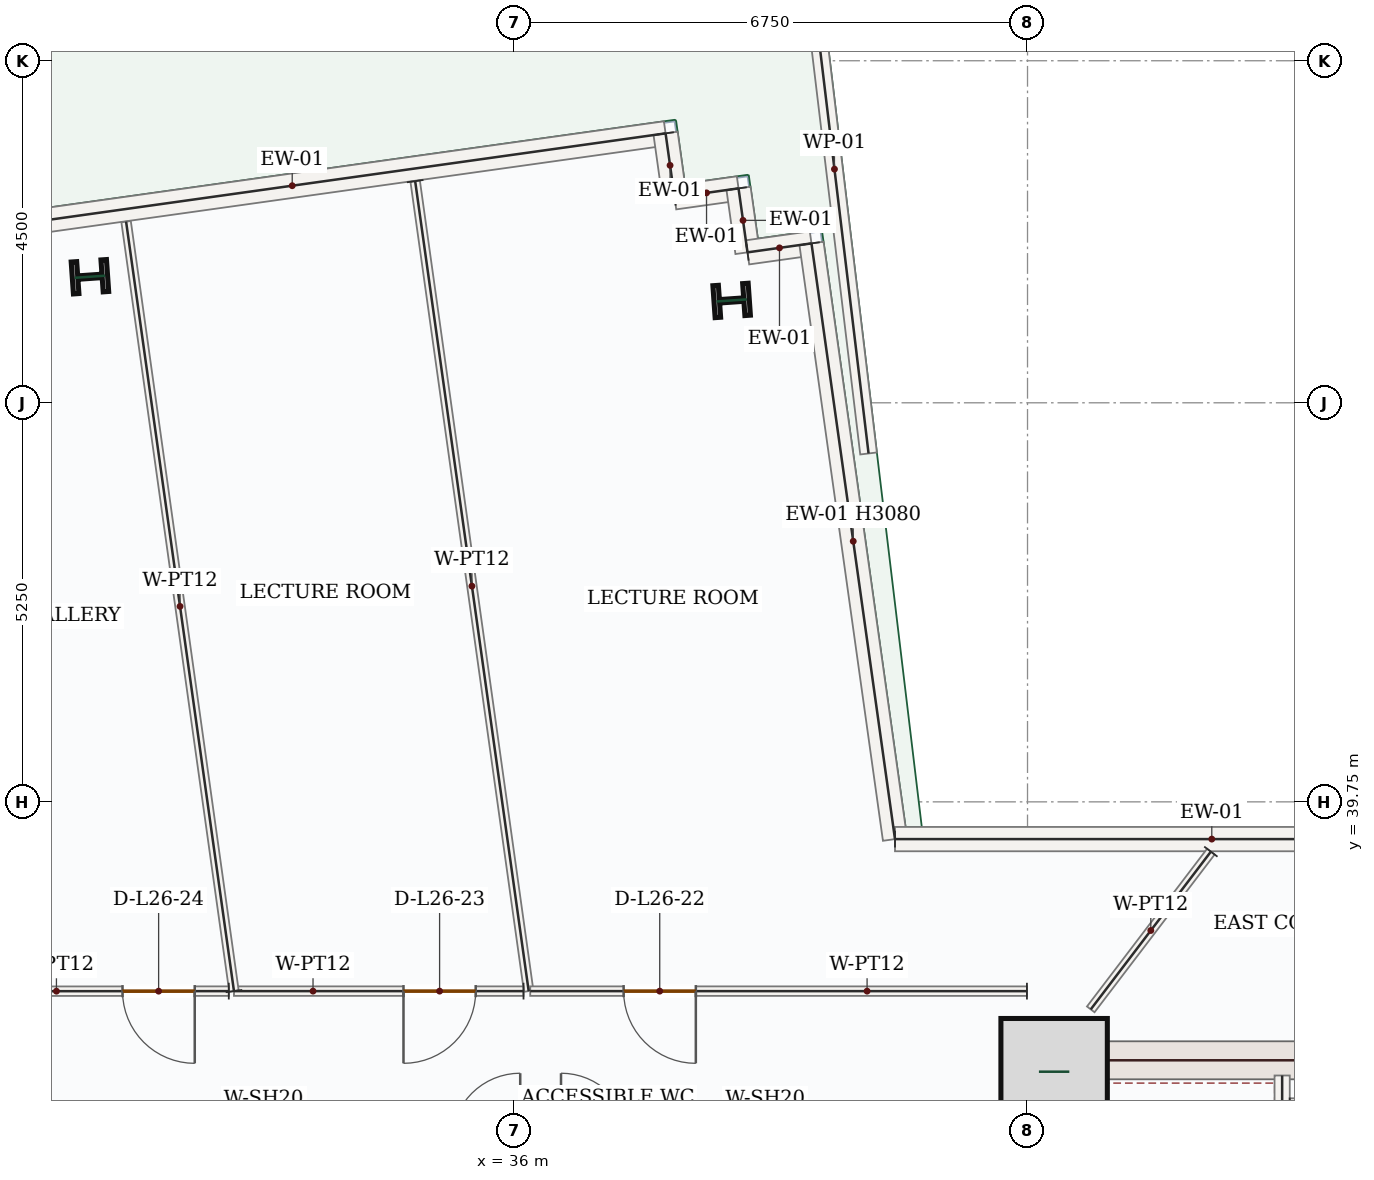
"""IFC4 building model, lengths in metres.
Left out: names, types, materials, properties, quantities, classifications, styles, units other than length and angle.
Written with IfcOpenShell. Run it as: python <this file> out.ifc"""

import sys

from ifc_helpers import new_model, si_unit, direction, frame, frame_2d, origin, origin_2d, place, context, subcontext, project, spatial, rectangle, i_section, extrude, source, transform, mapped, element, fill, save


model = new_model("IFC4")
c1 = context("Model", 3, precision=1e-05, world=origin(), true_north=direction((0.0, 1.0)))
c2 = subcontext(c1, "Body", "Model", "MODEL_VIEW")
j1 = project(units=[si_unit("LENGTHUNIT", "METRE"), si_unit("PLANEANGLEUNIT", "RADIAN")], contexts=[c1])
p1 = place(None, origin())
s1 = spatial("IfcSite", under=j1, at=p1, CompositionType="ELEMENT")
p2 = place(p1, origin())
s2 = spatial("IfcBuilding", under=s1, at=p2, CompositionType="ELEMENT")
p3 = place(p2, frame((0.0, 0.0, 117.3)))
s3 = spatial("IfcBuildingStorey", under=s2, at=p3, CompositionType="ELEMENT", Elevation=117.3)
p4 = place(p3, frame((43.0, 28.05, 0.0), z_axis=(0.0, 0.0, 1.0), x_axis=(0.0, 1.0, 0.0)))
e1 = element("IfcWall", 1, at=p4, inside=s3, PredefinedType="SHEAR", context=c2, shape_type="SweptSolid", body=[
    extrude(rectangle(XDim=8.55, YDim=0.5, at=frame_2d((4.275, 0.0))), origin(), (0.0, 0.0, 1.0), 3.95),
])
p5 = place(p4, frame((1.5, 0.0, 0.0)))
e2 = element("IfcOpeningElement", 2, at=p5, cuts=e1, PredefinedType="OPENING", context=c2, shape_type="SweptSolid", body=[
    extrude(rectangle(XDim=1.1, YDim=2.2, at=frame_2d((0.55, 1.1))), frame((0.0, 0.26, 0.0), z_axis=(0.0, -1.0, 0.0), x_axis=(1.0, 0.0, 0.0)), (0.0, 0.0, 1.0), 0.52),
])
m1 = source(origin(), c2, "Body", "SweptSolid", [
    extrude(rectangle(XDim=7.0, YDim=0.5, at=frame_2d((3.5, 0.0))), origin(), (0.0, 0.0, 1.0), 3.95),
])
p6 = place(p3, frame((43.25, 36.35, 0.0), z_axis=(0.0, 0.0, 1.0), x_axis=(1.0, 0.0, 0.0)))
e3 = element("IfcWall", 3, at=p6, inside=s3, PredefinedType="SHEAR", context=c2, shape_type="MappedRepresentation", body=[
    mapped(m1, transform((0.0, 0.0, 0.0), x_axis=(1.0, 0.0, 0.0), y_axis=(0.0, 1.0, 0.0), z_axis=(0.0, 0.0, 1.0), scale=1.0)),
])
m2 = source(origin(), c2, "Body", "SweptSolid", [
    extrude(rectangle(XDim=1.4, YDim=1.4, at=origin_2d()), origin(), (0.0, 0.0, 1.0), 4.2),
])
p7 = place(p3, frame((43.1, 36.2, 0.0), z_axis=(0.0, 0.0, 1.0), x_axis=(1.0, 0.0, 0.0)))
e4 = element("IfcColumn", 4, at=p7, inside=s3, PredefinedType="COLUMN", context=c2, shape_type="MappedRepresentation", body=[
    mapped(m2, transform((0.0, 0.0, 0.0), x_axis=(1.0, 0.0, 0.0), y_axis=(0.0, 1.0, 0.0), z_axis=(0.0, 0.0, 1.0), scale=1.0)),
])
m3 = source(origin(), c2, "Body", "SweptSolid", [
    extrude(i_section(OverallWidth=0.421, OverallDepth=0.465, WebThickness=0.045, FlangeThickness=0.073, FilletRadius=0.018, at=origin_2d()), origin(), (0.0, 0.0, 1.0), 4.2),
])
for number, where, z_axis, x_axis in (
    (5, (38.857, 46.346, 0.0), (0.0, 0.0, 1.0), (-0.07, 0.998, 0.0)),
    (6, (30.415, 46.658, 0.0), (0.0, 0.0, 1.0), (-0.07, 0.998, 0.0)),
):
    element("IfcColumn", number, at=place(p3, frame(where, z_axis=z_axis, x_axis=x_axis)), inside=s3, PredefinedType="COLUMN", context=c2, shape_type="MappedRepresentation", body=[
        mapped(m3, transform((0.0, 0.0, 0.0), x_axis=(1.0, 0.0, 0.0), y_axis=(0.0, 1.0, 0.0), z_axis=(0.0, 0.0, 1.0), scale=1.0)),
    ])
m4 = source(origin(), c2, "Body", "SweptSolid", [
    extrude(rectangle(XDim=7.535, YDim=0.22, at=frame_2d((3.768, 0.0))), origin(), (0.0, 0.0, 1.0), 1.2),
])
p8 = place(p3, frame((39.761, 51.815, 0.0), z_axis=(0.0, 0.0, 1.0), x_axis=(0.119076226187, -0.992885115387, 0.0)))
e7 = element("IfcWall", 7, at=p8, inside=s3, PredefinedType="PARAPET", context=c2, shape_type="MappedRepresentation", body=[
    mapped(m4, transform((0.0, 0.0, 0.0), x_axis=(1.0, 0.0, 0.0), y_axis=(0.0, 1.0, 0.0), z_axis=(0.0, 0.0, 1.0), scale=1.0)),
])
m5 = source(origin(), c2, "Body", "SweptSolid", [
    extrude(rectangle(XDim=9.92, YDim=0.32, at=frame_2d((4.96, 0.0))), origin(), (0.0, 0.0, 1.0), 3.95),
])
p9 = place(p3, frame((28.164, 47.167, 0.0), z_axis=(0.0, 0.0, 1.0), x_axis=(0.990316250135, 0.138829840876, 0.0)))
e8 = element("IfcWall", 8, at=p9, inside=s3, PredefinedType="SOLIDWALL", context=c2, shape_type="MappedRepresentation", body=[
    mapped(m5, transform((0.0, 0.0, 0.0), x_axis=(1.0, 0.0, 0.0), y_axis=(0.0, 1.0, 0.0), z_axis=(0.0, 0.0, 1.0), scale=1.0)),
])
m6 = source(origin(), c2, "Body", "SweptSolid", [
    extrude(rectangle(XDim=0.85, YDim=0.32, at=frame_2d((0.425, 0.0))), origin(), (0.0, 0.0, 1.0), 3.95),
])
for number, where, z_axis, x_axis in (
    (9, (37.988, 48.545, 0.0), (0.0, 0.0, 1.0), (0.139, -0.99, 0.0)),
    (10, (38.106, 47.703, 0.0), (0.0, 0.0, 1.0), (0.99, 0.139, 0.0)),
    (11, (38.948, 47.821, 0.0), (0.0, 0.0, 1.0), (0.139, -0.99, 0.0)),
    (12, (39.066, 46.979, 0.0), (0.0, 0.0, 1.0), (0.99, 0.139, 0.0)),
):
    element("IfcWall", number, at=place(p3, frame(where, z_axis=z_axis, x_axis=x_axis)), inside=s3, PredefinedType="SOLIDWALL", context=c2, shape_type="MappedRepresentation", body=[
        mapped(m6, transform((0.0, 0.0, 0.0), x_axis=(1.0, 0.0, 0.0), y_axis=(0.0, 1.0, 0.0), z_axis=(0.0, 0.0, 1.0), scale=1.0)),
    ])
m7 = source(origin(), c2, "Body", "SweptSolid", [
    extrude(rectangle(XDim=7.914, YDim=0.32, at=frame_2d((3.957, 0.0))), origin(), (0.0, 0.0, 1.0), 3.08),
])
p10 = place(p3, frame((39.908, 47.097, 0.0), z_axis=(0.0, 0.0, 1.0), x_axis=(0.138855403592, -0.990312666229, 0.0)))
e13 = element("IfcWall", 13, at=p10, inside=s3, PredefinedType="SOLIDWALL", context=c2, shape_type="MappedRepresentation", body=[
    mapped(m7, transform((0.0, 0.0, 0.0), x_axis=(1.0, 0.0, 0.0), y_axis=(0.0, 1.0, 0.0), z_axis=(0.0, 0.0, 1.0), scale=1.0)),
])
m8 = source(origin(), c2, "Body", "SweptSolid", [
    extrude(rectangle(XDim=8.335, YDim=0.32, at=frame_2d((4.168, 0.0))), origin(), (0.0, 0.0, 1.0), 3.95),
])
p11 = place(p3, frame((41.007, 39.26, 0.0), z_axis=(0.0, 0.0, 1.0), x_axis=(1.0, 0.0, 0.0)))
e14 = element("IfcWall", 14, at=p11, inside=s3, PredefinedType="SOLIDWALL", context=c2, shape_type="MappedRepresentation", body=[
    mapped(m8, transform((0.0, 0.0, 0.0), x_axis=(1.0, 0.0, 0.0), y_axis=(0.0, 1.0, 0.0), z_axis=(0.0, 0.0, 1.0), scale=1.0)),
])
p12 = place(p3, frame((46.1, 28.15, 0.0), z_axis=(0.0, 0.0, 1.0), x_axis=(0.0, 1.0, 0.0)))
e15 = element("IfcWall", 15, at=p12, inside=s3, PredefinedType="SOLIDWALL", context=c2, shape_type="SweptSolid", body=[
    extrude(rectangle(XDim=8.0, YDim=0.2, at=frame_2d((4.0, 0.0))), origin(), (0.0, 0.0, 1.0), 3.95),
])
p13 = place(p12, frame((0.4, 0.0, 0.0)))
e16 = element("IfcOpeningElement", 16, at=p13, cuts=e15, PredefinedType="OPENING", context=c2, shape_type="SweptSolid", body=[
    extrude(rectangle(XDim=1.05, YDim=2.15, at=frame_2d((0.525, 1.075))), frame((0.0, 0.11, 0.0), z_axis=(0.0, -1.0, 0.0), x_axis=(1.0, 0.0, 0.0)), (0.0, 0.0, 1.0), 0.22),
])
m9 = source(origin(), c2, "Body", "SweptSolid", [
    extrude(rectangle(XDim=3.25, YDim=0.2, at=frame_2d((1.625, 0.0))), origin(), (0.0, 0.0, 1.0), 3.95),
])
p14 = place(p3, frame((46.2, 35.75, 0.0), z_axis=(0.0, 0.0, 1.0), x_axis=(1.0, 0.0, 0.0)))
e17 = element("IfcWall", 17, at=p14, inside=s3, PredefinedType="SOLIDWALL", context=c2, shape_type="MappedRepresentation", body=[
    mapped(m9, transform((0.0, 0.0, 0.0), x_axis=(1.0, 0.0, 0.0), y_axis=(0.0, 1.0, 0.0), z_axis=(0.0, 0.0, 1.0), scale=1.0)),
])
m10 = source(origin(), c2, "Body", "SweptSolid", [
    extrude(rectangle(XDim=10.76, YDim=0.125, at=frame_2d((5.38, 0.0))), origin(), (0.0, 0.0, 1.0), 3.95),
])
p15 = place(p3, frame((34.694, 47.916, 0.0), z_axis=(0.0, 0.0, 1.0), x_axis=(0.138832093167, -0.99031593439, 0.0)))
e18 = element("IfcWall", 18, at=p15, inside=s3, PredefinedType="PARTITIONING", context=c2, shape_type="MappedRepresentation", body=[
    mapped(m10, transform((0.0, 0.0, 0.0), x_axis=(1.0, 0.0, 0.0), y_axis=(0.0, 1.0, 0.0), z_axis=(0.0, 0.0, 1.0), scale=1.0)),
])
p16 = place(p3, frame((36.119, 37.26, 0.0), z_axis=(0.0, 0.0, 1.0), x_axis=(-1.0, 0.0, 0.0)))
e19 = element("IfcWall", 19, at=p16, inside=s3, PredefinedType="PARTITIONING", context=c2, shape_type="SweptSolid", body=[
    extrude(rectangle(XDim=3.809, YDim=0.125, at=frame_2d((1.905, 0.0))), origin(), (0.0, 0.0, 1.0), 3.95),
])
p17 = place(p16, frame((0.629, 0.0, 0.0)))
e20 = element("IfcOpeningElement", 20, at=p17, cuts=e19, PredefinedType="OPENING", context=c2, shape_type="SweptSolid", body=[
    extrude(rectangle(XDim=0.95, YDim=2.15, at=frame_2d((0.475, 1.075))), frame((0.0, 0.073, 0.0), z_axis=(0.0, -1.0, 0.0), x_axis=(1.0, 0.0, 0.0)), (0.0, 0.0, 1.0), 0.145),
])
m11 = source(origin(), c2, "Body", "SweptSolid", [
    extrude(rectangle(XDim=10.222, YDim=0.125, at=frame_2d((5.111, 0.0))), origin(), (0.0, 0.0, 1.0), 3.95),
])
p18 = place(p3, frame((32.31, 37.26, 0.0), z_axis=(0.0, 0.0, 1.0), x_axis=(-0.138816035819, 0.990318185332, 0.0)))
e21 = element("IfcWall", 21, at=p18, inside=s3, PredefinedType="PARTITIONING", context=c2, shape_type="MappedRepresentation", body=[
    mapped(m11, transform((0.0, 0.0, 0.0), x_axis=(1.0, 0.0, 0.0), y_axis=(0.0, 1.0, 0.0), z_axis=(0.0, 0.0, 1.0), scale=1.0)),
])
p19 = place(p3, frame((32.242, 37.26, 0.0), z_axis=(0.0, 0.0, 1.0), x_axis=(-0.999999916483, -0.00040869704, 0.0)))
e22 = element("IfcWall", 22, at=p19, inside=s3, PredefinedType="PARTITIONING", context=c2, shape_type="SweptSolid", body=[
    extrude(rectangle(XDim=2.987, YDim=0.125, at=frame_2d((1.493, 0.0))), origin(), (0.0, 0.0, 1.0), 3.95),
])
p20 = place(p19, frame((0.448, 0.0, 0.0)))
e23 = element("IfcOpeningElement", 23, at=p20, cuts=e22, PredefinedType="OPENING", context=c2, shape_type="SweptSolid", body=[
    extrude(rectangle(XDim=0.95, YDim=2.15, at=frame_2d((0.475, 1.075))), frame((0.0, 0.073, 0.0), z_axis=(0.0, -1.0, 0.0), x_axis=(1.0, 0.0, 0.0)), (0.0, 0.0, 1.0), 0.145),
])
p21 = place(p3, frame((42.742, 37.26, 0.0), z_axis=(0.0, 0.0, 1.0), x_axis=(-0.999999999302, 3.7359435e-05, 0.0)))
e24 = element("IfcWall", 24, at=p21, inside=s3, PredefinedType="PARTITIONING", context=c2, shape_type="SweptSolid", body=[
    extrude(rectangle(XDim=6.535, YDim=0.125, at=frame_2d((3.268, 0.0))), origin(), (0.0, 0.0, 1.0), 3.95),
])
p22 = place(p21, frame((4.356, 0.0, 0.0)))
e25 = element("IfcOpeningElement", 25, at=p22, cuts=e24, PredefinedType="OPENING", context=c2, shape_type="SweptSolid", body=[
    extrude(rectangle(XDim=0.95, YDim=2.15, at=frame_2d((0.475, 1.075))), frame((0.0, 0.073, 0.0), z_axis=(0.0, -1.0, 0.0), x_axis=(1.0, 0.0, 0.0)), (0.0, 0.0, 1.0), 0.145),
])
m12 = source(origin(), c2, "Body", "SweptSolid", [
    extrude(rectangle(XDim=2.608, YDim=0.125, at=frame_2d((1.304, 0.0))), origin(), (0.0, 0.0, 1.0), 3.95),
])
p23 = place(p3, frame((45.162, 39.095, 0.0), z_axis=(0.0, 0.0, 1.0), x_axis=(-0.605840128894, -0.795586411537, 0.0)))
e26 = element("IfcWall", 26, at=p23, inside=s3, PredefinedType="PARTITIONING", context=c2, shape_type="MappedRepresentation", body=[
    mapped(m12, transform((0.0, 0.0, 0.0), x_axis=(1.0, 0.0, 0.0), y_axis=(0.0, 1.0, 0.0), z_axis=(0.0, 0.0, 1.0), scale=1.0)),
])
m13 = source(origin(), c2, "Body", "SweptSolid", [
    extrude(rectangle(XDim=0.95, YDim=2.15, at=frame_2d((0.475, 1.075))), frame((0.0, 0.025, 0.0), z_axis=(0.0, -1.0, 0.0), x_axis=(1.0, 0.0, 0.0)), (0.0, 0.0, 1.0), 0.05),
])
p24 = place(p22, origin())
e27 = element("IfcDoor", 27, at=p24, inside=s3, OperationType="SINGLE_SWING_LEFT", PredefinedType="DOOR", context=c2, shape_type="MappedRepresentation", body=[
    mapped(m13, transform((0.0, 0.0, 0.0), x_axis=(1.0, 0.0, 0.0), y_axis=(0.0, 1.0, 0.0), z_axis=(0.0, 0.0, 1.0), scale=1.0)),
])
fill(e25, e27)
p25 = place(p17, origin())
e28 = element("IfcDoor", 28, at=p25, inside=s3, OperationType="SINGLE_SWING_RIGHT", PredefinedType="DOOR", context=c2, shape_type="MappedRepresentation", body=[
    mapped(m13, transform((0.0, 0.0, 0.0), x_axis=(1.0, 0.0, 0.0), y_axis=(0.0, 1.0, 0.0), z_axis=(0.0, 0.0, 1.0), scale=1.0)),
])
fill(e20, e28)
p26 = place(p20, origin())
e29 = element("IfcDoor", 29, at=p26, inside=s3, OperationType="SINGLE_SWING_LEFT", PredefinedType="DOOR", context=c2, shape_type="MappedRepresentation", body=[
    mapped(m13, transform((0.0, 0.0, 0.0), x_axis=(1.0, 0.0, 0.0), y_axis=(0.0, 1.0, 0.0), z_axis=(0.0, 0.0, 1.0), scale=1.0)),
])
fill(e23, e29)
save(model, sys.argv[1])
